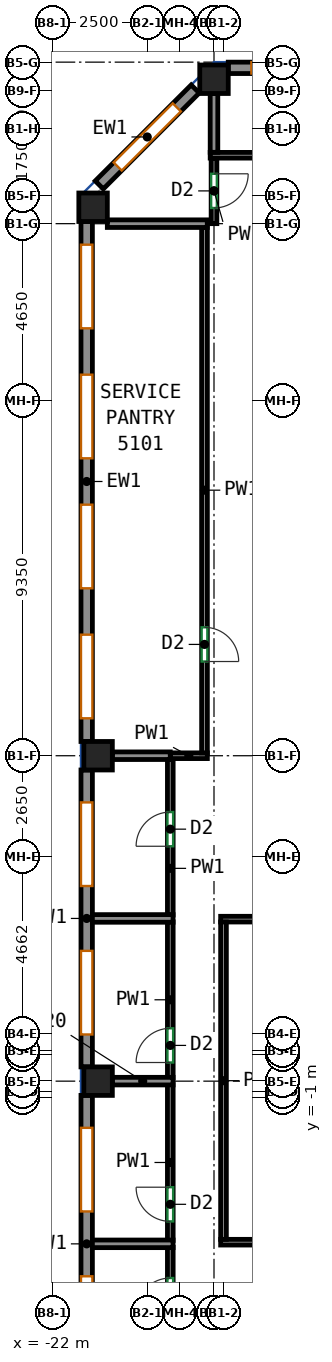
"""IFC4 building model, lengths in metres.
Left out: names, types, materials, properties, quantities, classifications, styles, units other than length and angle.
Written with IfcOpenShell. Run it as: python <this file> out.ifc"""

import sys

from ifc_helpers import new_model, si_unit, direction, frame, frame_2d, origin, origin_2d, place, context, subcontext, project, spatial, rectangle, extrude, source, transform, mapped, element, fill, save


model = new_model("IFC4")
c1 = context("Model", 3, precision=1e-05, world=origin(), true_north=direction((0.0, 1.0)))
c2 = subcontext(c1, "Body", "Model", "MODEL_VIEW")
j1 = project(units=[si_unit("LENGTHUNIT", "METRE"), si_unit("PLANEANGLEUNIT", "RADIAN")], contexts=[c1])
p1 = place(None, origin())
s1 = spatial("IfcSite", under=j1, at=p1, CompositionType="ELEMENT")
p2 = place(p1, origin())
s2 = spatial("IfcBuilding", under=s1, at=p2, CompositionType="ELEMENT")
p3 = place(p2, frame((0.0, 0.0, 210.1)))
s3 = spatial("IfcBuildingStorey", under=s2, at=p3, CompositionType="ELEMENT", Elevation=210.1)
m1 = source(origin(), c2, "Body", "SweptSolid", [
    extrude(rectangle(XDim=0.75, YDim=0.75, at=origin_2d()), origin(), (0.0, 0.0, 1.0), 3.12),
])
for number, where, z_axis, x_axis in (
    (1, (-20.932, 22.432, 0.0), (0.0, 0.0, 1.0), (1.0, 0.0, 0.0)),
    (2, (-20.8, -0.562, 0.0), (0.0, 0.0, 1.0), (1.0, 0.0, 0.0)),
    (3, (-20.8, 8.0, 0.0), (0.0, 0.0, 1.0), (1.0, 0.0, 0.0)),
    (4, (-17.75, 25.8, 0.0), (0.0, 0.0, 1.0), (1.0, 0.0, 0.0)),
):
    element("IfcColumn", number, at=place(p3, frame(where, z_axis=z_axis, x_axis=x_axis)), inside=s3, PredefinedType="COLUMN", context=c2, shape_type="MappedRepresentation", body=[
        mapped(m1, transform((0.0, 0.0, 0.0))),
    ])
m2 = source(origin(), c2, "Body", "SweptSolid", [
    extrude(rectangle(XDim=6.833, YDim=0.3, at=frame_2d((3.417, 0.0))), origin(), (0.0, 0.0, 1.0), 3.12),
])
p4 = place(p3, frame((-10.542, 26.1, 0.0), z_axis=(0.0, 0.0, 1.0), x_axis=(-1.0, 0.0, 0.0)))
e5 = element("IfcWall", 5, at=p4, inside=s3, PredefinedType="SOLIDWALL", context=c2, shape_type="MappedRepresentation", body=[
    mapped(m2, transform((0.0, 0.0, 0.0))),
])
p5 = place(p4, frame((0.608, 0.0, 0.85)))
e6 = element("IfcOpeningElement", 6, at=p5, cuts=e5, PredefinedType="OPENING", context=c2, shape_type="SweptSolid", body=[
    extrude(rectangle(XDim=2.2, YDim=1.95, at=frame_2d((1.1, 0.975))), frame((0.0, 0.16, 0.0), z_axis=(0.0, -1.0, 0.0), x_axis=(1.0, 0.0, 0.0)), (0.0, 0.0, 1.0), 0.32),
])
p6 = place(p4, frame((4.025, 0.0, 0.85)))
e7 = element("IfcOpeningElement", 7, at=p6, cuts=e5, PredefinedType="OPENING", context=c2, shape_type="SweptSolid", body=[
    extrude(rectangle(XDim=2.2, YDim=1.95, at=frame_2d((1.1, 0.975))), frame((0.0, 0.16, 0.0), z_axis=(0.0, -1.0, 0.0), x_axis=(1.0, 0.0, 0.0)), (0.0, 0.0, 1.0), 0.32),
])
m3 = source(origin(), c2, "Body", "SweptSolid", [
    extrude(rectangle(XDim=3.571, YDim=0.3, at=frame_2d((1.786, 0.0))), origin(), (0.0, 0.0, 1.0), 3.12),
])
p7 = place(p3, frame((-18.244, 25.544, 0.0), z_axis=(0.0, 0.0, 1.0), x_axis=(-0.707072595841, -0.707140964879, 0.0)))
e8 = element("IfcWall", 8, at=p7, inside=s3, PredefinedType="SOLIDWALL", context=c2, shape_type="MappedRepresentation", body=[
    mapped(m3, transform((0.0, 0.0, 0.0))),
])
p8 = place(p7, frame((0.686, 0.0, 0.85)))
e9 = element("IfcOpeningElement", 9, at=p8, cuts=e8, PredefinedType="OPENING", context=c2, shape_type="SweptSolid", body=[
    extrude(rectangle(XDim=2.2, YDim=1.95, at=frame_2d((1.1, 0.975))), frame((0.0, 0.16, 0.0), z_axis=(0.0, -1.0, 0.0), x_axis=(1.0, 0.0, 0.0)), (0.0, 0.0, 1.0), 0.32),
])
m4 = source(origin(), c2, "Body", "SweptSolid", [
    extrude(rectangle(XDim=13.682, YDim=0.3, at=frame_2d((6.841, 0.0))), origin(), (0.0, 0.0, 1.0), 3.12),
])
p9 = place(p3, frame((-21.1, 22.057, 0.0), z_axis=(0.0, 0.0, 1.0), x_axis=(0.0, -1.0, 0.0)))
e10 = element("IfcWall", 10, at=p9, inside=s3, PredefinedType="SOLIDWALL", context=c2, shape_type="MappedRepresentation", body=[
    mapped(m4, transform((0.0, 0.0, 0.0))),
])
p10 = place(p9, frame((0.61, 0.0, 0.85)))
e11 = element("IfcOpeningElement", 11, at=p10, cuts=e10, PredefinedType="OPENING", context=c2, shape_type="SweptSolid", body=[
    extrude(rectangle(XDim=2.2, YDim=1.95, at=frame_2d((1.1, 0.975))), frame((0.0, 0.16, 0.0), z_axis=(0.0, -1.0, 0.0), x_axis=(1.0, 0.0, 0.0)), (0.0, 0.0, 1.0), 0.32),
])
p11 = place(p9, frame((4.031, 0.0, 0.85)))
e12 = element("IfcOpeningElement", 12, at=p11, cuts=e10, PredefinedType="OPENING", context=c2, shape_type="SweptSolid", body=[
    extrude(rectangle(XDim=2.2, YDim=1.95, at=frame_2d((1.1, 0.975))), frame((0.0, 0.16, 0.0), z_axis=(0.0, -1.0, 0.0), x_axis=(1.0, 0.0, 0.0)), (0.0, 0.0, 1.0), 0.32),
])
p12 = place(p9, frame((7.451, 0.0, 0.85)))
e13 = element("IfcOpeningElement", 13, at=p12, cuts=e10, PredefinedType="OPENING", context=c2, shape_type="SweptSolid", body=[
    extrude(rectangle(XDim=2.2, YDim=1.95, at=frame_2d((1.1, 0.975))), frame((0.0, 0.16, 0.0), z_axis=(0.0, -1.0, 0.0), x_axis=(1.0, 0.0, 0.0)), (0.0, 0.0, 1.0), 0.32),
])
p13 = place(p9, frame((10.872, 0.0, 0.85)))
e14 = element("IfcOpeningElement", 14, at=p13, cuts=e10, PredefinedType="OPENING", context=c2, shape_type="SweptSolid", body=[
    extrude(rectangle(XDim=2.2, YDim=1.95, at=frame_2d((1.1, 0.975))), frame((0.0, 0.16, 0.0), z_axis=(0.0, -1.0, 0.0), x_axis=(1.0, 0.0, 0.0)), (0.0, 0.0, 1.0), 0.32),
])
m5 = source(origin(), c2, "Body", "SweptSolid", [
    extrude(rectangle(XDim=7.812, YDim=0.3, at=frame_2d((3.906, 0.0))), origin(), (0.0, 0.0, 1.0), 3.12),
])
p14 = place(p3, frame((-21.1, 7.625, 0.0), z_axis=(0.0, 0.0, 1.0), x_axis=(0.0, -1.0, 0.0)))
e15 = element("IfcWall", 15, at=p14, inside=s3, PredefinedType="SOLIDWALL", context=c2, shape_type="MappedRepresentation", body=[
    mapped(m5, transform((0.0, 0.0, 0.0))),
])
p15 = place(p14, frame((0.853, 0.0, 0.85)))
e16 = element("IfcOpeningElement", 16, at=p15, cuts=e15, PredefinedType="OPENING", context=c2, shape_type="SweptSolid", body=[
    extrude(rectangle(XDim=2.2, YDim=1.95, at=frame_2d((1.1, 0.975))), frame((0.0, 0.16, 0.0), z_axis=(0.0, -1.0, 0.0), x_axis=(1.0, 0.0, 0.0)), (0.0, 0.0, 1.0), 0.32),
])
p16 = place(p14, frame((4.759, 0.0, 0.85)))
e17 = element("IfcOpeningElement", 17, at=p16, cuts=e15, PredefinedType="OPENING", context=c2, shape_type="SweptSolid", body=[
    extrude(rectangle(XDim=2.2, YDim=1.95, at=frame_2d((1.1, 0.975))), frame((0.0, 0.16, 0.0), z_axis=(0.0, -1.0, 0.0), x_axis=(1.0, 0.0, 0.0)), (0.0, 0.0, 1.0), 0.32),
])
p17 = place(p3, frame((-21.1, -0.938, 0.0), z_axis=(0.0, 0.0, 1.0), x_axis=(0.0, -1.0, 0.0)))
e18 = element("IfcWall", 18, at=p17, inside=s3, PredefinedType="SOLIDWALL", context=c2, shape_type="MappedRepresentation", body=[
    mapped(m5, transform((0.0, 0.0, 0.0))),
])
p18 = place(p17, frame((0.853, 0.0, 0.85)))
e19 = element("IfcOpeningElement", 19, at=p18, cuts=e18, PredefinedType="OPENING", context=c2, shape_type="SweptSolid", body=[
    extrude(rectangle(XDim=2.2, YDim=1.95, at=frame_2d((1.1, 0.975))), frame((0.0, 0.16, 0.0), z_axis=(0.0, -1.0, 0.0), x_axis=(1.0, 0.0, 0.0)), (0.0, 0.0, 1.0), 0.32),
])
p19 = place(p17, frame((4.76, 0.0, 0.85)))
e20 = element("IfcOpeningElement", 20, at=p19, cuts=e18, PredefinedType="OPENING", context=c2, shape_type="SweptSolid", body=[
    extrude(rectangle(XDim=2.2, YDim=1.95, at=frame_2d((1.1, 0.975))), frame((0.0, 0.16, 0.0), z_axis=(0.0, -1.0, 0.0), x_axis=(1.0, 0.0, 0.0)), (0.0, 0.0, 1.0), 0.32),
])
p20 = place(p3, frame((-17.925, 8.0, 0.0), z_axis=(0.0, 0.0, 1.0), x_axis=(-1.0, 0.0, 0.0)))
e21 = element("IfcWall", 21, at=p20, inside=s3, PredefinedType="PARTITIONING", context=c2, shape_type="SweptSolid", body=[
    extrude(rectangle(XDim=0.976, YDim=0.15, at=frame_2d((0.488, 0.0))), origin(), (0.0, 0.0, 1.0), 3.12),
])
p21 = place(p3, frame((-18.0, 21.9, 0.0), z_axis=(0.0, 0.0, 1.0), x_axis=(0.0, -1.0, 0.0)))
e22 = element("IfcWall", 22, at=p21, inside=s3, PredefinedType="PARTITIONING", context=c2, shape_type="SweptSolid", body=[
    extrude(rectangle(XDim=13.825, YDim=0.15, at=frame_2d((6.913, 0.0))), origin(), (0.0, 0.0, 1.0), 3.12),
])
p22 = place(p21, frame((10.521, 0.0, 0.0)))
e23 = element("IfcOpeningElement", 23, at=p22, cuts=e22, PredefinedType="OPENING", context=c2, shape_type="SweptSolid", body=[
    extrude(rectangle(XDim=0.9, YDim=2.1, at=frame_2d((0.45, 1.05))), frame((0.0, 0.085, 0.0), z_axis=(0.0, -1.0, 0.0), x_axis=(1.0, 0.0, 0.0)), (0.0, 0.0, 1.0), 0.17),
])
p23 = place(p3, frame((-18.9, -7.757, 0.0), z_axis=(0.0, 0.0, 1.0), x_axis=(0.0, 1.0, 0.0)))
e24 = element("IfcWall", 24, at=p23, inside=s3, PredefinedType="PARTITIONING", context=c2, shape_type="SweptSolid", body=[
    extrude(rectangle(XDim=2.824, YDim=0.15, at=frame_2d((1.412, 0.0))), origin(), (0.0, 0.0, 1.0), 3.12),
])
p24 = place(p23, frame((1.114, 0.0, 0.0)))
e25 = element("IfcOpeningElement", 25, at=p24, cuts=e24, PredefinedType="OPENING", context=c2, shape_type="SweptSolid", body=[
    extrude(rectangle(XDim=0.9, YDim=2.1, at=frame_2d((0.45, 1.05))), frame((0.0, 0.085, 0.0), z_axis=(0.0, -1.0, 0.0), x_axis=(1.0, 0.0, 0.0)), (0.0, 0.0, 1.0), 0.17),
])
p25 = place(p3, frame((-18.9, -4.753, 0.0), z_axis=(0.0, 0.0, 1.0), x_axis=(0.0, 1.0, 0.0)))
e26 = element("IfcWall", 26, at=p25, inside=s3, PredefinedType="PARTITIONING", context=c2, shape_type="SweptSolid", body=[
    extrude(rectangle(XDim=4.101, YDim=0.15, at=frame_2d((2.05, 0.0))), origin(), (0.0, 0.0, 1.0), 3.12),
])
p26 = place(p25, frame((0.5, 0.0, 0.0)))
e27 = element("IfcOpeningElement", 27, at=p26, cuts=e26, PredefinedType="OPENING", context=c2, shape_type="SweptSolid", body=[
    extrude(rectangle(XDim=0.9, YDim=2.1, at=frame_2d((0.45, 1.05))), frame((0.0, 0.085, 0.0), z_axis=(0.0, -1.0, 0.0), x_axis=(1.0, 0.0, 0.0)), (0.0, 0.0, 1.0), 0.17),
])
p27 = place(p3, frame((-18.9, -0.472, 0.0), z_axis=(0.0, 0.0, 1.0), x_axis=(0.0, 1.0, 0.0)))
e28 = element("IfcWall", 28, at=p27, inside=s3, PredefinedType="PARTITIONING", context=c2, shape_type="SweptSolid", body=[
    extrude(rectangle(XDim=4.101, YDim=0.15, at=frame_2d((2.05, 0.0))), origin(), (0.0, 0.0, 1.0), 3.12),
])
p28 = place(p27, frame((0.4, 0.0, 0.0)))
e29 = element("IfcOpeningElement", 29, at=p28, cuts=e28, PredefinedType="OPENING", context=c2, shape_type="SweptSolid", body=[
    extrude(rectangle(XDim=0.9, YDim=2.1, at=frame_2d((0.45, 1.05))), frame((0.0, 0.085, 0.0), z_axis=(0.0, -1.0, 0.0), x_axis=(1.0, 0.0, 0.0)), (0.0, 0.0, 1.0), 0.17),
])
p29 = place(p3, frame((-18.9, 3.809, 0.0), z_axis=(0.0, 0.0, 1.0), x_axis=(0.0, 1.0, 0.0)))
e30 = element("IfcWall", 30, at=p29, inside=s3, PredefinedType="PARTITIONING", context=c2, shape_type="SweptSolid", body=[
    extrude(rectangle(XDim=4.092, YDim=0.15, at=frame_2d((2.046, 0.0))), origin(), (0.0, 0.0, 1.0), 3.12),
])
p30 = place(p29, frame((1.809, 0.0, 0.0)))
e31 = element("IfcOpeningElement", 31, at=p30, cuts=e30, PredefinedType="OPENING", context=c2, shape_type="SweptSolid", body=[
    extrude(rectangle(XDim=0.9, YDim=2.1, at=frame_2d((0.45, 1.05))), frame((0.0, 0.085, 0.0), z_axis=(0.0, -1.0, 0.0), x_axis=(1.0, 0.0, 0.0)), (0.0, 0.0, 1.0), 0.17),
])
p31 = place(p3, frame((-17.75, 23.725, 0.0), z_axis=(0.0, 0.0, 1.0), x_axis=(0.0, -1.0, 0.0)))
e32 = element("IfcWall", 32, at=p31, inside=s3, PredefinedType="PARTITIONING", context=c2, shape_type="SweptSolid", body=[
    extrude(rectangle(XDim=1.725, YDim=0.15, at=frame_2d((0.863, 0.0))), origin(), (0.0, 0.0, 1.0), 3.12),
])
p32 = place(p31, frame((0.413, 0.0, 0.0)))
e33 = element("IfcOpeningElement", 33, at=p32, cuts=e32, PredefinedType="OPENING", context=c2, shape_type="SweptSolid", body=[
    extrude(rectangle(XDim=0.9, YDim=2.1, at=frame_2d((0.45, 1.05))), frame((0.0, 0.085, 0.0), z_axis=(0.0, -1.0, 0.0), x_axis=(1.0, 0.0, 0.0)), (0.0, 0.0, 1.0), 0.17),
])
p33 = place(p3, frame((27.85, 23.8, 0.0), z_axis=(0.0, 0.0, 1.0), x_axis=(-1.0, 0.0, 0.0)))
e34 = element("IfcWall", 34, at=p33, inside=s3, PredefinedType="PARTITIONING", context=c2, shape_type="SweptSolid", body=[
    extrude(rectangle(XDim=45.7, YDim=0.15, at=frame_2d((22.85, 0.0))), origin(), (0.0, 0.0, 1.0), 3.12),
])
p34 = place(p33, frame((16.838, 0.0, 0.0)))
e35 = element("IfcOpeningElement", 35, at=p34, cuts=e34, PredefinedType="OPENING", context=c2, shape_type="SweptSolid", body=[
    extrude(rectangle(XDim=1.0, YDim=2.1, at=frame_2d((0.5, 1.05))), frame((0.0, 0.085, 0.0), z_axis=(0.0, -1.0, 0.0), x_axis=(1.0, 0.0, 0.0)), (0.0, 0.0, 1.0), 0.17),
])
p35 = place(p3, frame((-17.575, -4.8, 0.0), z_axis=(0.0, 0.0, 1.0), x_axis=(1.0, 0.0, 0.0)))
e36 = element("IfcWall", 36, at=p35, inside=s3, PredefinedType="PARTITIONING", context=c2, shape_type="SweptSolid", body=[
    extrude(rectangle(XDim=3.702, YDim=0.15, at=frame_2d((1.851, 0.0))), origin(), (0.0, 0.0, 1.0), 3.12),
])
p36 = place(p3, frame((-17.575, 3.7, 0.0), z_axis=(0.0, 0.0, 1.0), x_axis=(1.0, 0.0, 0.0)))
e37 = element("IfcWall", 37, at=p36, inside=s3, PredefinedType="PARTITIONING", context=c2, shape_type="SweptSolid", body=[
    extrude(rectangle(XDim=33.85, YDim=0.15, at=frame_2d((16.925, 0.0))), origin(), (0.0, 0.0, 1.0), 3.12),
])
p37 = place(p36, frame((1.902, 0.0, 0.0)))
e38 = element("IfcOpeningElement", 38, at=p37, cuts=e37, PredefinedType="OPENING", context=c2, shape_type="SweptSolid", body=[
    extrude(rectangle(XDim=0.9, YDim=2.1, at=frame_2d((0.45, 1.05))), frame((0.0, 0.085, 0.0), z_axis=(0.0, -1.0, 0.0), x_axis=(1.0, 0.0, 0.0)), (0.0, 0.0, 1.0), 0.17),
])
p38 = place(p36, frame((15.841, 0.0, 0.0)))
e39 = element("IfcOpeningElement", 39, at=p38, cuts=e37, PredefinedType="OPENING", context=c2, shape_type="SweptSolid", body=[
    extrude(rectangle(XDim=0.9, YDim=2.1, at=frame_2d((0.45, 1.05))), frame((0.0, 0.085, 0.0), z_axis=(0.0, -1.0, 0.0), x_axis=(1.0, 0.0, 0.0)), (0.0, 0.0, 1.0), 0.17),
])
p39 = place(p36, frame((20.724, 0.0, 0.0)))
e40 = element("IfcOpeningElement", 40, at=p39, cuts=e37, PredefinedType="OPENING", context=c2, shape_type="SweptSolid", body=[
    extrude(rectangle(XDim=0.9, YDim=2.1, at=frame_2d((0.45, 1.05))), frame((0.0, 0.085, 0.0), z_axis=(0.0, -1.0, 0.0), x_axis=(1.0, 0.0, 0.0)), (0.0, 0.0, 1.0), 0.17),
])
p40 = place(p36, frame((27.46, 0.0, 0.0)))
e41 = element("IfcOpeningElement", 41, at=p40, cuts=e37, PredefinedType="OPENING", context=c2, shape_type="SweptSolid", body=[
    extrude(rectangle(XDim=0.9, YDim=2.1, at=frame_2d((0.45, 1.05))), frame((0.0, 0.085, 0.0), z_axis=(0.0, -1.0, 0.0), x_axis=(1.0, 0.0, 0.0)), (0.0, 0.0, 1.0), 0.17),
])
p41 = place(p3, frame((-17.5, -4.725, 0.0), z_axis=(0.0, 0.0, 1.0), x_axis=(0.0, 1.0, 0.0)))
e42 = element("IfcWall", 42, at=p41, inside=s3, PredefinedType="PARTITIONING", context=c2, shape_type="SweptSolid", body=[
    extrude(rectangle(XDim=8.35, YDim=0.15, at=frame_2d((4.175, 0.0))), origin(), (0.0, 0.0, 1.0), 3.12),
])
p42 = place(p3, frame((-20.425, 8.0, 0.0), z_axis=(0.0, 0.0, 1.0), x_axis=(0.999999794741, 0.000640717472, 0.0)))
e43 = element("IfcWall", 43, at=p42, inside=s3, PredefinedType="PARTITIONING", context=c2, shape_type="SweptSolid", body=[
    extrude(rectangle(XDim=1.524, YDim=0.2, at=frame_2d((0.762, 0.0))), origin(), (0.0, 0.0, 1.0), 3.12),
])
p43 = place(p3, frame((-17.927, 22.0, 0.0), z_axis=(0.0, 0.0, 1.0), x_axis=(-1.0, 0.0, 0.0)))
e44 = element("IfcWall", 44, at=p43, inside=s3, PredefinedType="PARTITIONING", context=c2, shape_type="SweptSolid", body=[
    extrude(rectangle(XDim=2.63, YDim=0.2, at=frame_2d((1.315, 0.0))), origin(), (0.0, 0.0, 1.0), 3.12),
])
p44 = place(p3, frame((-21.0, -4.843, 0.0), z_axis=(0.0, 0.0, 1.0), x_axis=(1.0, 0.0, 0.0)))
e45 = element("IfcWall", 45, at=p44, inside=s3, PredefinedType="PARTITIONING", context=c2, shape_type="SweptSolid", body=[
    extrude(rectangle(XDim=2.173, YDim=0.2, at=frame_2d((1.086, 0.0))), origin(), (0.0, 0.0, 1.0), 3.12),
])
p45 = place(p3, frame((-18.827, -0.562, 0.0), z_axis=(0.0, 0.0, 1.0), x_axis=(-1.0, 0.0, 0.0)))
e46 = element("IfcWall", 46, at=p45, inside=s3, PredefinedType="PARTITIONING", context=c2, shape_type="SweptSolid", body=[
    extrude(rectangle(XDim=1.598, YDim=0.2, at=frame_2d((0.799, 0.0))), origin(), (0.0, 0.0, 1.0), 2.52),
])
p46 = place(p3, frame((-21.0, 3.719, 0.0), z_axis=(0.0, 0.0, 1.0), x_axis=(1.0, 0.0, 0.0)))
e47 = element("IfcWall", 47, at=p46, inside=s3, PredefinedType="PARTITIONING", context=c2, shape_type="SweptSolid", body=[
    extrude(rectangle(XDim=2.173, YDim=0.2, at=frame_2d((1.086, 0.0))), origin(), (0.0, 0.0, 1.0), 3.12),
])
p47 = place(p3, frame((-17.75, 23.877, 0.0), z_axis=(0.0, 0.0, 1.0), x_axis=(0.0, 1.0, 0.0)))
e48 = element("IfcWall", 48, at=p47, inside=s3, PredefinedType="PARTITIONING", context=c2, shape_type="SweptSolid", body=[
    extrude(rectangle(XDim=1.548, YDim=0.2, at=frame_2d((0.774, 0.0))), origin(), (0.0, 0.0, 1.0), 3.12),
])
p48 = place(p6, origin())
e49 = element("IfcWindow", 49, at=p48, inside=s3, PartitioningType="SINGLE_PANEL", PredefinedType="WINDOW", context=c2, shape_type="SweptSolid", body=[
    extrude(rectangle(XDim=2.2, YDim=1.95, at=frame_2d((1.1, 0.975))), frame((0.0, 0.03, 0.0), z_axis=(0.0, -1.0, 0.0), x_axis=(1.0, 0.0, 0.0)), (0.0, 0.0, 1.0), 0.06),
])
fill(e7, e49)
p49 = place(p8, origin())
e50 = element("IfcWindow", 50, at=p49, inside=s3, PartitioningType="SINGLE_PANEL", PredefinedType="WINDOW", context=c2, shape_type="SweptSolid", body=[
    extrude(rectangle(XDim=2.2, YDim=1.95, at=frame_2d((1.1, 0.975))), frame((0.0, 0.03, 0.0), z_axis=(0.0, -1.0, 0.0), x_axis=(1.0, 0.0, 0.0)), (0.0, 0.0, 1.0), 0.06),
])
fill(e9, e50)
p50 = place(p10, origin())
e51 = element("IfcWindow", 51, at=p50, inside=s3, PartitioningType="SINGLE_PANEL", PredefinedType="WINDOW", context=c2, shape_type="SweptSolid", body=[
    extrude(rectangle(XDim=2.2, YDim=1.95, at=frame_2d((1.1, 0.975))), frame((0.0, 0.03, 0.0), z_axis=(0.0, -1.0, 0.0), x_axis=(1.0, 0.0, 0.0)), (0.0, 0.0, 1.0), 0.06),
])
fill(e11, e51)
p51 = place(p11, origin())
e52 = element("IfcWindow", 52, at=p51, inside=s3, PartitioningType="SINGLE_PANEL", PredefinedType="WINDOW", context=c2, shape_type="SweptSolid", body=[
    extrude(rectangle(XDim=2.2, YDim=1.95, at=frame_2d((1.1, 0.975))), frame((0.0, 0.03, 0.0), z_axis=(0.0, -1.0, 0.0), x_axis=(1.0, 0.0, 0.0)), (0.0, 0.0, 1.0), 0.06),
])
fill(e12, e52)
p52 = place(p12, origin())
e53 = element("IfcWindow", 53, at=p52, inside=s3, PartitioningType="SINGLE_PANEL", PredefinedType="WINDOW", context=c2, shape_type="SweptSolid", body=[
    extrude(rectangle(XDim=2.2, YDim=1.95, at=frame_2d((1.1, 0.975))), frame((0.0, 0.03, 0.0), z_axis=(0.0, -1.0, 0.0), x_axis=(1.0, 0.0, 0.0)), (0.0, 0.0, 1.0), 0.06),
])
fill(e13, e53)
p53 = place(p13, origin())
e54 = element("IfcWindow", 54, at=p53, inside=s3, PartitioningType="SINGLE_PANEL", PredefinedType="WINDOW", context=c2, shape_type="SweptSolid", body=[
    extrude(rectangle(XDim=2.2, YDim=1.95, at=frame_2d((1.1, 0.975))), frame((0.0, 0.03, 0.0), z_axis=(0.0, -1.0, 0.0), x_axis=(1.0, 0.0, 0.0)), (0.0, 0.0, 1.0), 0.06),
])
fill(e14, e54)
p54 = place(p15, origin())
e55 = element("IfcWindow", 55, at=p54, inside=s3, PartitioningType="SINGLE_PANEL", PredefinedType="WINDOW", context=c2, shape_type="SweptSolid", body=[
    extrude(rectangle(XDim=2.2, YDim=1.95, at=frame_2d((1.1, 0.975))), frame((0.0, 0.03, 0.0), z_axis=(0.0, -1.0, 0.0), x_axis=(1.0, 0.0, 0.0)), (0.0, 0.0, 1.0), 0.06),
])
fill(e16, e55)
p55 = place(p16, origin())
e56 = element("IfcWindow", 56, at=p55, inside=s3, PartitioningType="SINGLE_PANEL", PredefinedType="WINDOW", context=c2, shape_type="SweptSolid", body=[
    extrude(rectangle(XDim=2.2, YDim=1.95, at=frame_2d((1.1, 0.975))), frame((0.0, 0.03, 0.0), z_axis=(0.0, -1.0, 0.0), x_axis=(1.0, 0.0, 0.0)), (0.0, 0.0, 1.0), 0.06),
])
fill(e17, e56)
p56 = place(p18, origin())
e57 = element("IfcWindow", 57, at=p56, inside=s3, PartitioningType="SINGLE_PANEL", PredefinedType="WINDOW", context=c2, shape_type="SweptSolid", body=[
    extrude(rectangle(XDim=2.2, YDim=1.95, at=frame_2d((1.1, 0.975))), frame((0.0, 0.03, 0.0), z_axis=(0.0, -1.0, 0.0), x_axis=(1.0, 0.0, 0.0)), (0.0, 0.0, 1.0), 0.06),
])
fill(e19, e57)
p57 = place(p19, origin())
e58 = element("IfcWindow", 58, at=p57, inside=s3, PartitioningType="SINGLE_PANEL", PredefinedType="WINDOW", context=c2, shape_type="SweptSolid", body=[
    extrude(rectangle(XDim=2.2, YDim=1.95, at=frame_2d((1.1, 0.975))), frame((0.0, 0.03, 0.0), z_axis=(0.0, -1.0, 0.0), x_axis=(1.0, 0.0, 0.0)), (0.0, 0.0, 1.0), 0.06),
])
fill(e20, e58)
p58 = place(p24, origin())
e59 = element("IfcDoor", 59, at=p58, inside=s3, OperationType="SINGLE_SWING_LEFT", PredefinedType="DOOR", context=c2, shape_type="SweptSolid", body=[
    extrude(rectangle(XDim=0.9, YDim=2.1, at=frame_2d((0.45, 1.05))), frame((0.0, 0.025, 0.0), z_axis=(0.0, -1.0, 0.0), x_axis=(1.0, 0.0, 0.0)), (0.0, 0.0, 1.0), 0.05),
])
fill(e25, e59)
p59 = place(p26, origin())
e60 = element("IfcDoor", 60, at=p59, inside=s3, OperationType="SINGLE_SWING_RIGHT", PredefinedType="DOOR", context=c2, shape_type="SweptSolid", body=[
    extrude(rectangle(XDim=0.9, YDim=2.1, at=frame_2d((0.45, 1.05))), frame((0.0, 0.025, 0.0), z_axis=(0.0, -1.0, 0.0), x_axis=(1.0, 0.0, 0.0)), (0.0, 0.0, 1.0), 0.05),
])
fill(e27, e60)
p60 = place(p28, origin())
e61 = element("IfcDoor", 61, at=p60, inside=s3, OperationType="SINGLE_SWING_LEFT", PredefinedType="DOOR", context=c2, shape_type="SweptSolid", body=[
    extrude(rectangle(XDim=0.9, YDim=2.1, at=frame_2d((0.45, 1.05))), frame((0.0, 0.025, 0.0), z_axis=(0.0, -1.0, 0.0), x_axis=(1.0, 0.0, 0.0)), (0.0, 0.0, 1.0), 0.05),
])
fill(e29, e61)
p61 = place(p30, origin())
e62 = element("IfcDoor", 62, at=p61, inside=s3, OperationType="SINGLE_SWING_LEFT", PredefinedType="DOOR", context=c2, shape_type="SweptSolid", body=[
    extrude(rectangle(XDim=0.9, YDim=2.1, at=frame_2d((0.45, 1.05))), frame((0.0, 0.025, 0.0), z_axis=(0.0, -1.0, 0.0), x_axis=(1.0, 0.0, 0.0)), (0.0, 0.0, 1.0), 0.05),
])
fill(e31, e62)
p62 = place(p22, origin())
e63 = element("IfcDoor", 63, at=p62, inside=s3, OperationType="SINGLE_SWING_RIGHT", PredefinedType="DOOR", context=c2, shape_type="SweptSolid", body=[
    extrude(rectangle(XDim=0.9, YDim=2.1, at=frame_2d((0.45, 1.05))), frame((0.0, 0.025, 0.0), z_axis=(0.0, -1.0, 0.0), x_axis=(1.0, 0.0, 0.0)), (0.0, 0.0, 1.0), 0.05),
])
fill(e23, e63)
p63 = place(p32, origin())
e64 = element("IfcDoor", 64, at=p63, inside=s3, OperationType="SINGLE_SWING_LEFT", PredefinedType="DOOR", context=c2, shape_type="SweptSolid", body=[
    extrude(rectangle(XDim=0.9, YDim=2.1, at=frame_2d((0.45, 1.05))), frame((0.0, 0.025, 0.0), z_axis=(0.0, -1.0, 0.0), x_axis=(1.0, 0.0, 0.0)), (0.0, 0.0, 1.0), 0.05),
])
fill(e33, e64)
save(model, sys.argv[1])
